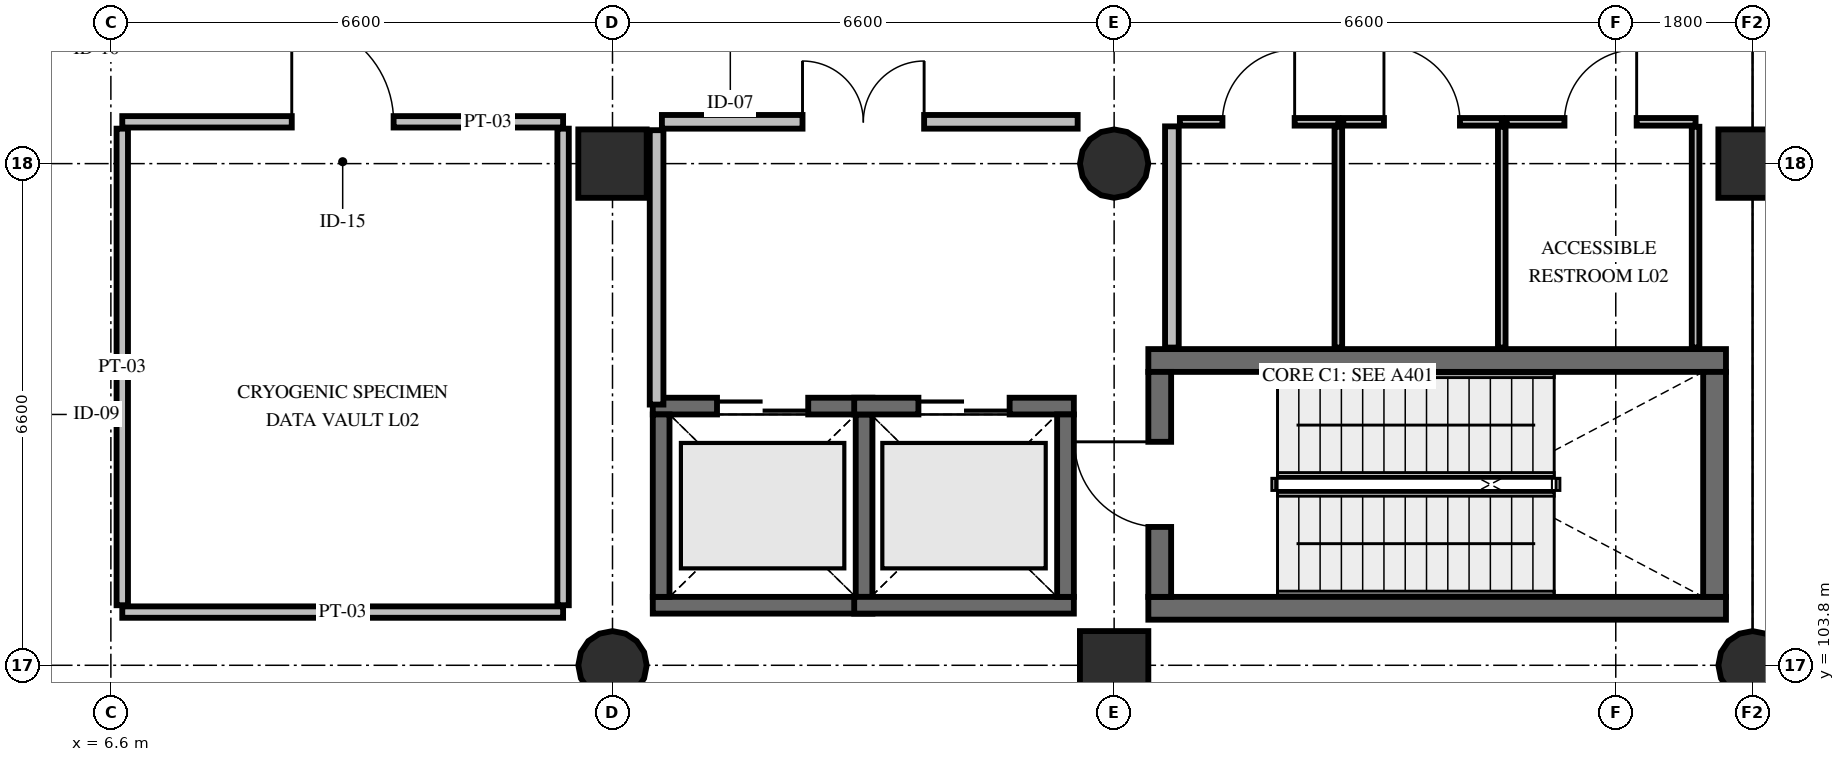
"""IFC4 building model, lengths in metres.
Left out: names, types, materials, properties, quantities, classifications, styles, units other than length and angle.
Written with IfcOpenShell. Run it as: python <this file> out.ifc"""

import sys

from ifc_helpers import new_model, si_unit, direction, frame, frame_2d, origin, origin_2d, place, context, subcontext, project, spatial, rectangle, circle, extrude, element, fill, save


model = new_model("IFC4")
c1 = context("Model", 3, precision=1e-05, world=origin(), true_north=direction((0.0, 1.0)))
c2 = subcontext(c1, "Body", "Model", "MODEL_VIEW")
j1 = project(units=[si_unit("LENGTHUNIT", "METRE"), si_unit("PLANEANGLEUNIT", "RADIAN")], contexts=[c1])
p1 = place(None, origin())
s1 = spatial("IfcSite", under=j1, at=p1, CompositionType="ELEMENT")
p2 = place(p1, origin())
s2 = spatial("IfcBuilding", under=s1, at=p2, CompositionType="ELEMENT")
p3 = place(p2, frame((0.0, 0.0, 10.2)))
s3 = spatial("IfcBuildingStorey", under=s2, at=p3, CompositionType="ELEMENT", Elevation=10.2)
p4 = place(p3, frame((13.2, 103.8, 0.0), z_axis=(0.0, 0.0, 1.0), x_axis=(1.0, 0.0, 0.0)))
e1 = element("IfcColumn", 1, at=p4, inside=s3, PredefinedType="COLUMN", context=c2, shape_type="SweptSolid", body=[
    extrude(circle(Radius=0.45, at=origin_2d()), origin(), (0.0, 0.0, 1.0), 4.8),
])
for number, where, z_axis, x_axis in (
    (2, (13.2, 110.4, 0.0), (0.0, 0.0, 1.0), (1.0, 0.0, 0.0)),
    (3, (19.8, 103.8, 0.0), (0.0, 0.0, 1.0), (1.0, 0.0, 0.0)),
):
    element("IfcColumn", number, at=place(p3, frame(where, z_axis=z_axis, x_axis=x_axis)), inside=s3, PredefinedType="COLUMN", context=c2, shape_type="SweptSolid", body=[
        extrude(rectangle(XDim=0.9, YDim=0.9, at=origin_2d()), origin(), (0.0, 0.0, 1.0), 4.8),
    ])
for number, where, z_axis, x_axis in (
    (4, (19.8, 110.4, 0.0), (0.0, 0.0, 1.0), (1.0, 0.0, 0.0)),
    (5, (28.2, 103.8, 0.0), (0.0, 0.0, 1.0), (1.0, 0.0, 0.0)),
):
    element("IfcColumn", number, at=place(p3, frame(where, z_axis=z_axis, x_axis=x_axis)), inside=s3, PredefinedType="COLUMN", context=c2, shape_type="SweptSolid", body=[
        extrude(circle(Radius=0.45, at=origin_2d()), origin(), (0.0, 0.0, 1.0), 4.8),
    ])
p5 = place(p3, frame((28.2, 110.4, 0.0), z_axis=(0.0, 0.0, 1.0), x_axis=(1.0, 0.0, 0.0)))
e6 = element("IfcColumn", 6, at=p5, inside=s3, PredefinedType="COLUMN", context=c2, shape_type="SweptSolid", body=[
    extrude(rectangle(XDim=0.9, YDim=0.9, at=origin_2d()), origin(), (0.0, 0.0, 1.0), 4.8),
])
for number, where, z_axis, x_axis in (
    (7, (20.25, 104.55, 0.0), (0.0, 0.0, 1.0), (1.0, 0.0, 0.0)),
    (8, (20.25, 107.81, 0.0), (0.0, 0.0, 1.0), (1.0, 0.0, 0.0)),
):
    element("IfcWall", number, at=place(p3, frame(where, z_axis=z_axis, x_axis=x_axis)), inside=s3, PredefinedType="SHEAR", context=c2, shape_type="SweptSolid", body=[
        extrude(rectangle(XDim=7.6, YDim=0.3, at=frame_2d((3.8, 0.0))), origin(), (0.0, 0.0, 1.0), 4.48),
    ])
p6 = place(p3, frame((20.4, 104.7, 0.0), z_axis=(0.0, 0.0, 1.0), x_axis=(0.0, 1.0, 0.0)))
e9 = element("IfcWall", 9, at=p6, inside=s3, PredefinedType="SHEAR", context=c2, shape_type="SweptSolid", body=[
    extrude(rectangle(XDim=2.96, YDim=0.3, at=frame_2d((1.48, 0.0))), origin(), (0.0, 0.0, 1.0), 4.48),
])
p7 = place(p6, frame((0.92, 0.0, 0.0)))
e10 = element("IfcOpeningElement", 10, at=p7, cuts=e9, PredefinedType="OPENING", context=c2, shape_type="SweptSolid", body=[
    extrude(rectangle(XDim=1.12, YDim=2.2, at=frame_2d((0.56, 1.1))), frame((0.0, 0.165, 0.0), z_axis=(0.0, -1.0, 0.0), x_axis=(1.0, 0.0, 0.0)), (0.0, 0.0, 1.0), 0.33),
])
p8 = place(p3, frame((27.7, 104.7, 0.0), z_axis=(0.0, 0.0, 1.0), x_axis=(0.0, 1.0, 0.0)))
e11 = element("IfcWall", 11, at=p8, inside=s3, PredefinedType="SHEAR", context=c2, shape_type="SweptSolid", body=[
    extrude(rectangle(XDim=2.96, YDim=0.3, at=frame_2d((1.48, 0.0))), origin(), (0.0, 0.0, 1.0), 4.48),
])
p9 = place(p3, frame((13.73, 104.59, 0.0), z_axis=(0.0, 0.0, 1.0), x_axis=(1.0, 0.0, 0.0)))
e12 = element("IfcWall", 12, at=p9, inside=s3, PredefinedType="SHEAR", context=c2, shape_type="SweptSolid", body=[
    extrude(rectangle(XDim=2.89, YDim=0.22, at=frame_2d((1.445, 0.0))), origin(), (0.0, 0.0, 1.0), 4.48),
])
p10 = place(p3, frame((13.73, 107.21, 0.0), z_axis=(0.0, 0.0, 1.0), x_axis=(1.0, 0.0, 0.0)))
e13 = element("IfcWall", 13, at=p10, inside=s3, PredefinedType="SHEAR", context=c2, shape_type="SweptSolid", body=[
    extrude(rectangle(XDim=2.89, YDim=0.22, at=frame_2d((1.445, 0.0))), origin(), (0.0, 0.0, 1.0), 4.48),
])
p11 = place(p10, frame((0.845, 0.0, 0.0)))
e14 = element("IfcOpeningElement", 14, at=p11, cuts=e13, PredefinedType="OPENING", context=c2, shape_type="SweptSolid", body=[
    extrude(rectangle(XDim=1.2, YDim=2.2, at=frame_2d((0.6, 1.1))), frame((0.0, 0.125, 0.0), z_axis=(0.0, -1.0, 0.0), x_axis=(1.0, 0.0, 0.0)), (0.0, 0.0, 1.0), 0.25),
])
for number, where, z_axis, x_axis in (
    (15, (13.84, 104.7, 0.0), (0.0, 0.0, 1.0), (0.0, 1.0, 0.0)),
    (16, (16.51, 104.7, 0.0), (0.0, 0.0, 1.0), (0.0, 1.0, 0.0)),
):
    element("IfcWall", number, at=place(p3, frame(where, z_axis=z_axis, x_axis=x_axis)), inside=s3, PredefinedType="SHEAR", context=c2, shape_type="SweptSolid", body=[
        extrude(rectangle(XDim=2.4, YDim=0.22, at=frame_2d((1.2, 0.0))), origin(), (0.0, 0.0, 1.0), 4.48),
    ])
p12 = place(p3, frame((16.38, 104.59, 0.0), z_axis=(0.0, 0.0, 1.0), x_axis=(1.0, 0.0, 0.0)))
e17 = element("IfcWall", 17, at=p12, inside=s3, PredefinedType="SHEAR", context=c2, shape_type="SweptSolid", body=[
    extrude(rectangle(XDim=2.89, YDim=0.22, at=frame_2d((1.445, 0.0))), origin(), (0.0, 0.0, 1.0), 4.48),
])
p13 = place(p3, frame((16.38, 107.21, 0.0), z_axis=(0.0, 0.0, 1.0), x_axis=(1.0, 0.0, 0.0)))
e18 = element("IfcWall", 18, at=p13, inside=s3, PredefinedType="SHEAR", context=c2, shape_type="SweptSolid", body=[
    extrude(rectangle(XDim=2.89, YDim=0.22, at=frame_2d((1.445, 0.0))), origin(), (0.0, 0.0, 1.0), 4.48),
])
p14 = place(p13, frame((0.845, 0.0, 0.0)))
e19 = element("IfcOpeningElement", 19, at=p14, cuts=e18, PredefinedType="OPENING", context=c2, shape_type="SweptSolid", body=[
    extrude(rectangle(XDim=1.2, YDim=2.2, at=frame_2d((0.6, 1.1))), frame((0.0, 0.125, 0.0), z_axis=(0.0, -1.0, 0.0), x_axis=(1.0, 0.0, 0.0)), (0.0, 0.0, 1.0), 0.25),
])
p15 = place(p3, frame((19.16, 104.7, 0.0), z_axis=(0.0, 0.0, 1.0), x_axis=(0.0, 1.0, 0.0)))
e20 = element("IfcWall", 20, at=p15, inside=s3, PredefinedType="SHEAR", context=c2, shape_type="SweptSolid", body=[
    extrude(rectangle(XDim=2.4, YDim=0.22, at=frame_2d((1.2, 0.0))), origin(), (0.0, 0.0, 1.0), 4.48),
])
p16 = place(p3, frame((13.85, 110.95, 0.0), z_axis=(0.0, 0.0, 1.0), x_axis=(1.0, 0.0, 0.0)))
e21 = element("IfcWall", 21, at=p16, inside=s3, PredefinedType="PARTITIONING", context=c2, shape_type="SweptSolid", body=[
    extrude(rectangle(XDim=5.47, YDim=0.18, at=frame_2d((2.735, 0.0))), origin(), (0.0, 0.0, 1.0), 4.295),
])
p17 = place(p16, frame((1.85, 0.0, 0.0)))
e22 = element("IfcOpeningElement", 22, at=p17, cuts=e21, PredefinedType="OPENING", context=c2, shape_type="SweptSolid", body=[
    extrude(rectangle(XDim=1.6, YDim=2.25, at=frame_2d((0.8, 1.125))), frame((0.0, 0.105, 0.0), z_axis=(0.0, -1.0, 0.0), x_axis=(1.0, 0.0, 0.0)), (0.0, 0.0, 1.0), 0.21),
])
p18 = place(p3, frame((13.78, 107.23, 0.0), z_axis=(0.0, 0.0, 1.0), x_axis=(0.0, 1.0, 0.0)))
e23 = element("IfcWall", 23, at=p18, inside=s3, PredefinedType="PARTITIONING", context=c2, shape_type="SweptSolid", body=[
    extrude(rectangle(XDim=3.61, YDim=0.18, at=frame_2d((1.805, 0.0))), origin(), (0.0, 0.0, 1.0), 4.13),
])
p19 = place(p3, frame((20.56, 107.98, 0.0), z_axis=(0.0, 0.0, 1.0), x_axis=(0.0, 1.0, 0.0)))
e24 = element("IfcWall", 24, at=p19, inside=s3, PredefinedType="PARTITIONING", context=c2, shape_type="SweptSolid", body=[
    extrude(rectangle(XDim=2.91, YDim=0.18, at=frame_2d((1.455, 0.0))), origin(), (0.0, 0.0, 1.0), 3.83),
])
p20 = place(p3, frame((20.665, 110.95, 0.0), z_axis=(0.0, 0.0, 1.0), x_axis=(1.0, 0.0, 0.0)))
e25 = element("IfcWall", 25, at=p20, inside=s3, PredefinedType="PARTITIONING", context=c2, shape_type="SweptSolid", body=[
    extrude(rectangle(XDim=2.085, YDim=0.1, at=frame_2d((1.042, 0.0))), origin(), (0.0, 0.0, 1.0), 4.295),
])
p21 = place(p20, frame((0.56, 0.0, 0.0)))
e26 = element("IfcOpeningElement", 26, at=p21, cuts=e25, PredefinedType="OPENING", context=c2, shape_type="SweptSolid", body=[
    extrude(rectangle(XDim=0.95, YDim=2.15, at=frame_2d((0.475, 1.075))), frame((0.0, 0.065, 0.0), z_axis=(0.0, -1.0, 0.0), x_axis=(1.0, 0.0, 0.0)), (0.0, 0.0, 1.0), 0.13),
])
p22 = place(p3, frame((22.75, 107.98, 0.0), z_axis=(0.0, 0.0, 1.0), x_axis=(0.0, 1.0, 0.0)))
e27 = element("IfcWall", 27, at=p22, inside=s3, PredefinedType="PARTITIONING", context=c2, shape_type="SweptSolid", body=[
    extrude(rectangle(XDim=2.905, YDim=0.1, at=frame_2d((1.453, 0.0))), origin(), (0.0, 0.0, 1.0), 3.83),
])
p23 = place(p3, frame((22.815, 110.95, 0.0), z_axis=(0.0, 0.0, 1.0), x_axis=(1.0, 0.0, 0.0)))
e28 = element("IfcWall", 28, at=p23, inside=s3, PredefinedType="PARTITIONING", context=c2, shape_type="SweptSolid", body=[
    extrude(rectangle(XDim=2.085, YDim=0.1, at=frame_2d((1.042, 0.0))), origin(), (0.0, 0.0, 1.0), 4.46),
])
p24 = place(p23, frame((0.535, 0.0, 0.0)))
e29 = element("IfcOpeningElement", 29, at=p24, cuts=e28, PredefinedType="OPENING", context=c2, shape_type="SweptSolid", body=[
    extrude(rectangle(XDim=1.0, YDim=2.15, at=frame_2d((0.5, 1.075))), frame((0.0, 0.065, 0.0), z_axis=(0.0, -1.0, 0.0), x_axis=(1.0, 0.0, 0.0)), (0.0, 0.0, 1.0), 0.13),
])
p25 = place(p3, frame((24.9, 107.98, 0.0), z_axis=(0.0, 0.0, 1.0), x_axis=(0.0, 1.0, 0.0)))
e30 = element("IfcWall", 30, at=p25, inside=s3, PredefinedType="PARTITIONING", context=c2, shape_type="SweptSolid", body=[
    extrude(rectangle(XDim=2.905, YDim=0.1, at=frame_2d((1.453, 0.0))), origin(), (0.0, 0.0, 1.0), 3.83),
])
p26 = place(p3, frame((24.965, 110.95, 0.0), z_axis=(0.0, 0.0, 1.0), x_axis=(1.0, 0.0, 0.0)))
e31 = element("IfcWall", 31, at=p26, inside=s3, PredefinedType="PARTITIONING", context=c2, shape_type="SweptSolid", body=[
    extrude(rectangle(XDim=2.485, YDim=0.1, at=frame_2d((1.242, 0.0))), origin(), (0.0, 0.0, 1.0), 4.295),
])
p27 = place(p26, frame((0.76, 0.0, 0.0)))
e32 = element("IfcOpeningElement", 32, at=p27, cuts=e31, PredefinedType="OPENING", context=c2, shape_type="SweptSolid", body=[
    extrude(rectangle(XDim=0.95, YDim=2.15, at=frame_2d((0.475, 1.075))), frame((0.0, 0.065, 0.0), z_axis=(0.0, -1.0, 0.0), x_axis=(1.0, 0.0, 0.0)), (0.0, 0.0, 1.0), 0.13),
])
p28 = place(p3, frame((27.45, 107.98, 0.0), z_axis=(0.0, 0.0, 1.0), x_axis=(0.0, 1.0, 0.0)))
e33 = element("IfcWall", 33, at=p28, inside=s3, PredefinedType="PARTITIONING", context=c2, shape_type="SweptSolid", body=[
    extrude(rectangle(XDim=2.905, YDim=0.1, at=frame_2d((1.453, 0.0))), origin(), (0.0, 0.0, 1.0), 3.83),
])
p29 = place(p3, frame((6.75, 104.5, 0.0), z_axis=(0.0, 0.0, 1.0), x_axis=(1.0, 0.0, 0.0)))
e34 = element("IfcWall", 34, at=p29, inside=s3, PredefinedType="PARTITIONING", context=c2, shape_type="SweptSolid", body=[
    extrude(rectangle(XDim=5.8, YDim=0.15, at=frame_2d((2.9, 0.0))), origin(), (0.0, 0.0, 1.0), 4.295),
])
p30 = place(p3, frame((6.75, 110.95, 0.0), z_axis=(0.0, 0.0, 1.0), x_axis=(1.0, 0.0, 0.0)))
e35 = element("IfcWall", 35, at=p30, inside=s3, PredefinedType="PARTITIONING", context=c2, shape_type="SweptSolid", body=[
    extrude(rectangle(XDim=5.8, YDim=0.15, at=frame_2d((2.9, 0.0))), origin(), (0.0, 0.0, 1.0), 4.295),
])
p31 = place(p30, frame((2.23, 0.0, 0.0)))
e36 = element("IfcOpeningElement", 36, at=p31, cuts=e35, PredefinedType="OPENING", context=c2, shape_type="SweptSolid", body=[
    extrude(rectangle(XDim=1.34, YDim=2.2, at=frame_2d((0.67, 1.1))), frame((0.0, 0.09, 0.0), z_axis=(0.0, -1.0, 0.0), x_axis=(1.0, 0.0, 0.0)), (0.0, 0.0, 1.0), 0.18),
])
for number, where, z_axis, x_axis in (
    (37, (6.75, 104.59, 0.0), (0.0, 0.0, 1.0), (0.0, 1.0, 0.0)),
    (38, (12.55, 104.59, 0.0), (0.0, 0.0, 1.0), (0.0, 1.0, 0.0)),
):
    element("IfcWall", number, at=place(p3, frame(where, z_axis=z_axis, x_axis=x_axis)), inside=s3, PredefinedType="PARTITIONING", context=c2, shape_type="SweptSolid", body=[
        extrude(rectangle(XDim=6.27, YDim=0.15, at=frame_2d((3.135, 0.0))), origin(), (0.0, 0.0, 1.0), 3.83),
    ])
p32 = place(p7, origin())
e39 = element("IfcDoor", 39, at=p32, inside=s3, OperationType="SINGLE_SWING_RIGHT", PredefinedType="DOOR", context=c2, shape_type="SweptSolid", body=[
    extrude(rectangle(XDim=1.12, YDim=2.2, at=frame_2d((0.56, 1.1))), frame((0.0, 0.025, 0.0), z_axis=(0.0, -1.0, 0.0), x_axis=(1.0, 0.0, 0.0)), (0.0, 0.0, 1.0), 0.05),
])
fill(e10, e39)
p33 = place(p11, origin())
e40 = element("IfcDoor", 40, at=p33, inside=s3, OperationType="DOUBLE_DOOR_SLIDING", PredefinedType="DOOR", context=c2, shape_type="SweptSolid", body=[
    extrude(rectangle(XDim=1.2, YDim=2.2, at=frame_2d((0.6, 1.1))), frame((0.0, 0.025, 0.0), z_axis=(0.0, -1.0, 0.0), x_axis=(1.0, 0.0, 0.0)), (0.0, 0.0, 1.0), 0.05),
])
fill(e14, e40)
p34 = place(p14, origin())
e41 = element("IfcDoor", 41, at=p34, inside=s3, OperationType="DOUBLE_DOOR_SLIDING", PredefinedType="DOOR", context=c2, shape_type="SweptSolid", body=[
    extrude(rectangle(XDim=1.2, YDim=2.2, at=frame_2d((0.6, 1.1))), frame((0.0, 0.025, 0.0), z_axis=(0.0, -1.0, 0.0), x_axis=(1.0, 0.0, 0.0)), (0.0, 0.0, 1.0), 0.05),
])
fill(e19, e41)
p35 = place(p17, origin())
e42 = element("IfcDoor", 42, at=p35, inside=s3, OperationType="DOUBLE_DOOR_SINGLE_SWING", PredefinedType="DOOR", context=c2, shape_type="SweptSolid", body=[
    extrude(rectangle(XDim=1.6, YDim=2.25, at=frame_2d((0.8, 1.125))), frame((0.0, 0.025, 0.0), z_axis=(0.0, -1.0, 0.0), x_axis=(1.0, 0.0, 0.0)), (0.0, 0.0, 1.0), 0.05),
])
fill(e22, e42)
p36 = place(p21, origin())
e43 = element("IfcDoor", 43, at=p36, inside=s3, OperationType="SINGLE_SWING_RIGHT", PredefinedType="DOOR", context=c2, shape_type="SweptSolid", body=[
    extrude(rectangle(XDim=0.95, YDim=2.15, at=frame_2d((0.475, 1.075))), frame((0.0, 0.025, 0.0), z_axis=(0.0, -1.0, 0.0), x_axis=(1.0, 0.0, 0.0)), (0.0, 0.0, 1.0), 0.05),
])
fill(e26, e43)
p37 = place(p24, origin())
e44 = element("IfcDoor", 44, at=p37, inside=s3, OperationType="SINGLE_SWING_LEFT", PredefinedType="DOOR", context=c2, shape_type="SweptSolid", body=[
    extrude(rectangle(XDim=1.0, YDim=2.15, at=frame_2d((0.5, 1.075))), frame((0.0, 0.025, 0.0), z_axis=(0.0, -1.0, 0.0), x_axis=(1.0, 0.0, 0.0)), (0.0, 0.0, 1.0), 0.05),
])
fill(e29, e44)
p38 = place(p27, origin())
e45 = element("IfcDoor", 45, at=p38, inside=s3, OperationType="SINGLE_SWING_RIGHT", PredefinedType="DOOR", context=c2, shape_type="SweptSolid", body=[
    extrude(rectangle(XDim=0.95, YDim=2.15, at=frame_2d((0.475, 1.075))), frame((0.0, 0.025, 0.0), z_axis=(0.0, -1.0, 0.0), x_axis=(1.0, 0.0, 0.0)), (0.0, 0.0, 1.0), 0.05),
])
fill(e32, e45)
p39 = place(p31, origin())
e46 = element("IfcDoor", 46, at=p39, inside=s3, OperationType="SINGLE_SWING_LEFT", PredefinedType="DOOR", context=c2, shape_type="SweptSolid", body=[
    extrude(rectangle(XDim=1.34, YDim=2.2, at=frame_2d((0.67, 1.1))), frame((0.0, 0.025, 0.0), z_axis=(0.0, -1.0, 0.0), x_axis=(1.0, 0.0, 0.0)), (0.0, 0.0, 1.0), 0.05),
])
fill(e36, e46)
save(model, sys.argv[1])
